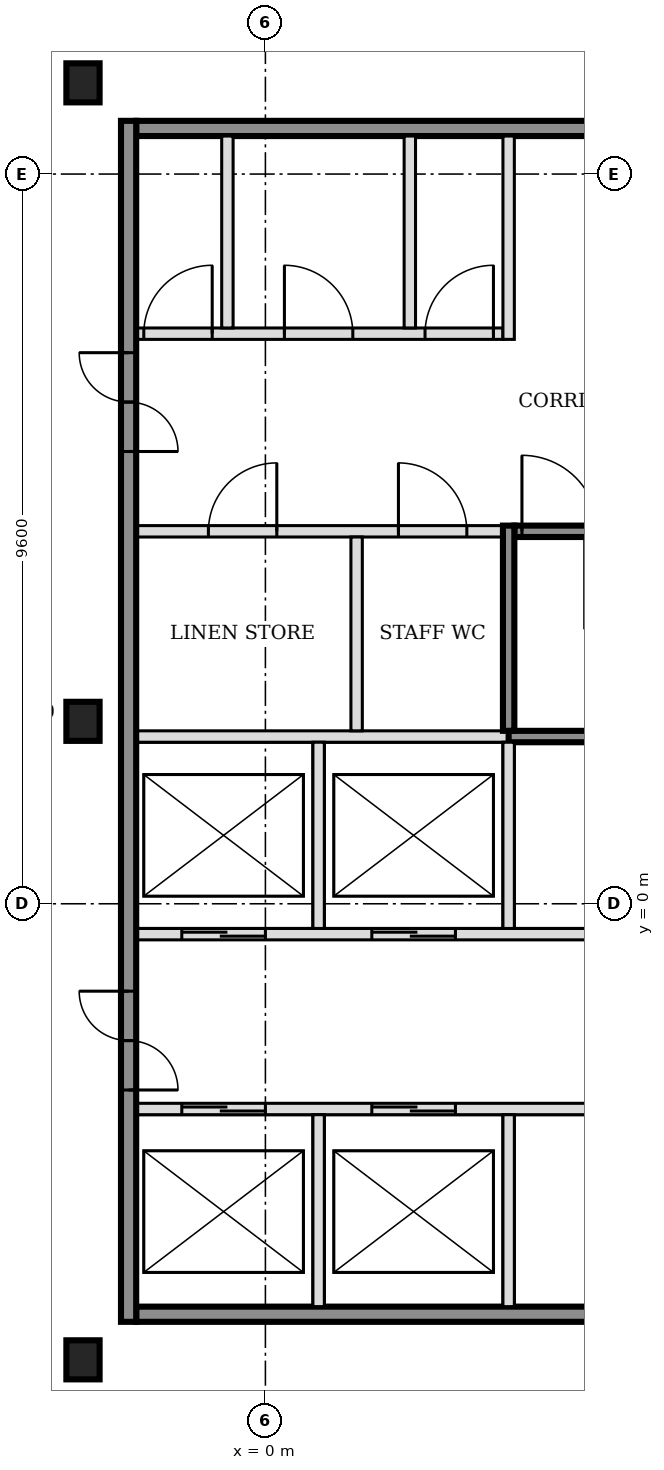
"""IFC4 building model, lengths in metres.
Left out: names, types, materials, properties, quantities, classifications, styles, units other than length and angle.
Written with IfcOpenShell. Run it as: python <this file> out.ifc"""

import sys

from ifc_helpers import new_model, si_unit, direction, frame, frame_2d, origin, origin_2d, place, context, subcontext, project, spatial, rectangle, i_section, extrude, element, fill, save


model = new_model("IFC4")
c1 = context("Model", 3, precision=1e-05, world=origin(), true_north=direction((0.0, 1.0)))
c2 = subcontext(c1, "Body", "Model", "MODEL_VIEW")
j1 = project(units=[si_unit("LENGTHUNIT", "METRE"), si_unit("PLANEANGLEUNIT", "RADIAN")], contexts=[c1])
p1 = place(None, origin())
s1 = spatial("IfcSite", under=j1, at=p1, CompositionType="ELEMENT")
p2 = place(p1, origin())
s2 = spatial("IfcBuilding", under=s1, at=p2, CompositionType="ELEMENT")
p3 = place(p2, frame((0.0, 0.0, 79.8)))
s3 = spatial("IfcBuildingStorey", under=s2, at=p3, CompositionType="ELEMENT", Elevation=79.8)
for number, where, z_axis, x_axis in (
    (1, (-2.4, -6.0, -0.15), (0.0, 0.0, 1.0), (1.0, 0.0, 0.0)),
    (2, (-2.4, 2.4, -0.15), (0.0, 0.0, 1.0), (1.0, 0.0, 0.0)),
    (3, (-2.4, 10.8, -0.15), (0.0, 0.0, 1.0), (1.0, 0.0, 0.0)),
):
    element("IfcColumn", number, at=place(p3, frame(where, z_axis=z_axis, x_axis=x_axis)), inside=s3, PredefinedType="COLUMN", context=c2, shape_type="SweptSolid", body=[
        extrude(i_section(OverallWidth=0.437, OverallDepth=0.514, WebThickness=0.061, FlangeThickness=0.097, FilletRadius=0.015, at=origin_2d()), origin(), (0.0, 0.0, 1.0), 3.6),
    ])
p4 = place(p3, frame((-1.7, -5.4, 0.0), z_axis=(0.0, 0.0, 1.0), x_axis=(1.0, 0.0, 0.0)))
e4 = element("IfcWall", 4, at=p4, inside=s3, PredefinedType="SOLIDWALL", context=c2, shape_type="SweptSolid", body=[
    extrude(rectangle(XDim=7.9, YDim=0.2, at=frame_2d((3.95, 0.0))), origin(), (0.0, 0.0, 1.0), 3.45),
])
p5 = place(p3, frame((-1.7, -2.7, 0.0), z_axis=(0.0, 0.0, 1.0), x_axis=(1.0, 0.0, 0.0)))
e5 = element("IfcWall", 5, at=p5, inside=s3, PredefinedType="SOLIDWALL", context=c2, shape_type="SweptSolid", body=[
    extrude(rectangle(XDim=7.9, YDim=0.15, at=frame_2d((3.95, 0.0))), origin(), (0.0, 0.0, 1.0), 3.45),
])
p6 = place(p5, frame((0.6, 0.0, 0.0)))
e6 = element("IfcOpeningElement", 6, at=p6, cuts=e5, PredefinedType="OPENING", context=c2, shape_type="SweptSolid", body=[
    extrude(rectangle(XDim=1.1, YDim=2.1, at=frame_2d((0.55, 1.05))), frame((0.0, 0.085, 0.0), z_axis=(0.0, -1.0, 0.0), x_axis=(1.0, 0.0, 0.0)), (0.0, 0.0, 1.0), 0.17),
])
p7 = place(p5, frame((3.1, 0.0, 0.0)))
e7 = element("IfcOpeningElement", 7, at=p7, cuts=e5, PredefinedType="OPENING", context=c2, shape_type="SweptSolid", body=[
    extrude(rectangle(XDim=1.1, YDim=2.1, at=frame_2d((0.55, 1.05))), frame((0.0, 0.085, 0.0), z_axis=(0.0, -1.0, 0.0), x_axis=(1.0, 0.0, 0.0)), (0.0, 0.0, 1.0), 0.17),
])
p8 = place(p3, frame((-1.7, -0.4, 0.0), z_axis=(0.0, 0.0, 1.0), x_axis=(1.0, 0.0, 0.0)))
e8 = element("IfcWall", 8, at=p8, inside=s3, PredefinedType="SOLIDWALL", context=c2, shape_type="SweptSolid", body=[
    extrude(rectangle(XDim=15.925, YDim=0.15, at=frame_2d((7.962, 0.0))), origin(), (0.0, 0.0, 1.0), 3.45),
])
p9 = place(p8, frame((0.6, 0.0, 0.0)))
e9 = element("IfcOpeningElement", 9, at=p9, cuts=e8, PredefinedType="OPENING", context=c2, shape_type="SweptSolid", body=[
    extrude(rectangle(XDim=1.1, YDim=2.1, at=frame_2d((0.55, 1.05))), frame((0.0, 0.085, 0.0), z_axis=(0.0, -1.0, 0.0), x_axis=(1.0, 0.0, 0.0)), (0.0, 0.0, 1.0), 0.17),
])
p10 = place(p8, frame((3.1, 0.0, 0.0)))
e10 = element("IfcOpeningElement", 10, at=p10, cuts=e8, PredefinedType="OPENING", context=c2, shape_type="SweptSolid", body=[
    extrude(rectangle(XDim=1.1, YDim=2.1, at=frame_2d((0.55, 1.05))), frame((0.0, 0.085, 0.0), z_axis=(0.0, -1.0, 0.0), x_axis=(1.0, 0.0, 0.0)), (0.0, 0.0, 1.0), 0.17),
])
p11 = place(p8, frame((11.575, 0.0, 0.0)))
e11 = element("IfcOpeningElement", 11, at=p11, cuts=e8, PredefinedType="OPENING", context=c2, shape_type="SweptSolid", body=[
    extrude(rectangle(XDim=1.2, YDim=2.1, at=frame_2d((0.6, 1.05))), frame((0.0, 0.085, 0.0), z_axis=(0.0, -1.0, 0.0), x_axis=(1.0, 0.0, 0.0)), (0.0, 0.0, 1.0), 0.17),
])
p12 = place(p8, frame((14.125, 0.0, 0.0)))
e12 = element("IfcOpeningElement", 12, at=p12, cuts=e8, PredefinedType="OPENING", context=c2, shape_type="SweptSolid", body=[
    extrude(rectangle(XDim=1.2, YDim=2.1, at=frame_2d((0.6, 1.05))), frame((0.0, 0.085, 0.0), z_axis=(0.0, -1.0, 0.0), x_axis=(1.0, 0.0, 0.0)), (0.0, 0.0, 1.0), 0.17),
])
p13 = place(p3, frame((-1.7, 2.2, 0.0), z_axis=(0.0, 0.0, 1.0), x_axis=(1.0, 0.0, 0.0)))
e13 = element("IfcWall", 13, at=p13, inside=s3, PredefinedType="SOLIDWALL", context=c2, shape_type="SweptSolid", body=[
    extrude(rectangle(XDim=4.9, YDim=0.15, at=frame_2d((2.45, 0.0))), origin(), (0.0, 0.0, 1.0), 3.45),
])
p14 = place(p3, frame((3.2, 2.2, 0.0), z_axis=(0.0, 0.0, 1.0), x_axis=(1.0, 0.0, 0.0)))
e14 = element("IfcWall", 14, at=p14, inside=s3, PredefinedType="SOLIDWALL", context=c2, shape_type="SweptSolid", body=[
    extrude(rectangle(XDim=6.5, YDim=0.15, at=frame_2d((3.25, 0.0))), origin(), (0.0, 0.0, 1.0), 3.45),
])
p15 = place(p3, frame((-1.7, 4.9, 0.0), z_axis=(0.0, 0.0, 1.0), x_axis=(1.0, 0.0, 0.0)))
e15 = element("IfcWall", 15, at=p15, inside=s3, PredefinedType="PARTITIONING", context=c2, shape_type="SweptSolid", body=[
    extrude(rectangle(XDim=4.825, YDim=0.15, at=frame_2d((2.413, 0.0))), origin(), (0.0, 0.0, 1.0), 3.45),
])
p16 = place(p15, frame((0.95, 0.0, 0.0)))
e16 = element("IfcOpeningElement", 16, at=p16, cuts=e15, PredefinedType="OPENING", context=c2, shape_type="SweptSolid", body=[
    extrude(rectangle(XDim=0.9, YDim=2.1, at=frame_2d((0.45, 1.05))), frame((0.0, 0.085, 0.0), z_axis=(0.0, -1.0, 0.0), x_axis=(1.0, 0.0, 0.0)), (0.0, 0.0, 1.0), 0.17),
])
p17 = place(p15, frame((3.45, 0.0, 0.0)))
e17 = element("IfcOpeningElement", 17, at=p17, cuts=e15, PredefinedType="OPENING", context=c2, shape_type="SweptSolid", body=[
    extrude(rectangle(XDim=0.9, YDim=2.1, at=frame_2d((0.45, 1.05))), frame((0.0, 0.085, 0.0), z_axis=(0.0, -1.0, 0.0), x_axis=(1.0, 0.0, 0.0)), (0.0, 0.0, 1.0), 0.17),
])
p18 = place(p3, frame((3.275, 4.9, 0.0), z_axis=(0.0, 0.0, 1.0), x_axis=(1.0, 0.0, 0.0)))
e18 = element("IfcWall", 18, at=p18, inside=s3, PredefinedType="SOLIDWALL", context=c2, shape_type="SweptSolid", body=[
    extrude(rectangle(XDim=6.425, YDim=0.15, at=frame_2d((3.212, 0.0))), origin(), (0.0, 0.0, 1.0), 3.45),
])
p19 = place(p18, frame((0.1, 0.0, 0.0)))
e19 = element("IfcOpeningElement", 19, at=p19, cuts=e18, PredefinedType="OPENING", context=c2, shape_type="SweptSolid", body=[
    extrude(rectangle(XDim=1.0, YDim=2.1, at=frame_2d((0.5, 1.05))), frame((0.0, 0.085, 0.0), z_axis=(0.0, -1.0, 0.0), x_axis=(1.0, 0.0, 0.0)), (0.0, 0.0, 1.0), 0.17),
])
p20 = place(p3, frame((-1.7, 7.5, 0.0), z_axis=(0.0, 0.0, 1.0), x_axis=(1.0, 0.0, 0.0)))
e20 = element("IfcWall", 20, at=p20, inside=s3, PredefinedType="PARTITIONING", context=c2, shape_type="SweptSolid", body=[
    extrude(rectangle(XDim=4.825, YDim=0.15, at=frame_2d((2.413, 0.0))), origin(), (0.0, 0.0, 1.0), 3.45),
])
p21 = place(p20, frame((0.1, 0.0, 0.0)))
e21 = element("IfcOpeningElement", 21, at=p21, cuts=e20, PredefinedType="OPENING", context=c2, shape_type="SweptSolid", body=[
    extrude(rectangle(XDim=0.9, YDim=2.1, at=frame_2d((0.45, 1.05))), frame((0.0, 0.085, 0.0), z_axis=(0.0, -1.0, 0.0), x_axis=(1.0, 0.0, 0.0)), (0.0, 0.0, 1.0), 0.17),
])
p22 = place(p20, frame((1.95, 0.0, 0.0)))
e22 = element("IfcOpeningElement", 22, at=p22, cuts=e20, PredefinedType="OPENING", context=c2, shape_type="SweptSolid", body=[
    extrude(rectangle(XDim=0.9, YDim=2.1, at=frame_2d((0.45, 1.05))), frame((0.0, 0.085, 0.0), z_axis=(0.0, -1.0, 0.0), x_axis=(1.0, 0.0, 0.0)), (0.0, 0.0, 1.0), 0.17),
])
p23 = place(p20, frame((3.8, 0.0, 0.0)))
e23 = element("IfcOpeningElement", 23, at=p23, cuts=e20, PredefinedType="OPENING", context=c2, shape_type="SweptSolid", body=[
    extrude(rectangle(XDim=0.9, YDim=2.1, at=frame_2d((0.45, 1.05))), frame((0.0, 0.085, 0.0), z_axis=(0.0, -1.0, 0.0), x_axis=(1.0, 0.0, 0.0)), (0.0, 0.0, 1.0), 0.17),
])
p24 = place(p3, frame((-1.7, 10.2, 0.0), z_axis=(0.0, 0.0, 1.0), x_axis=(1.0, 0.0, 0.0)))
e24 = element("IfcWall", 24, at=p24, inside=s3, PredefinedType="SOLIDWALL", context=c2, shape_type="SweptSolid", body=[
    extrude(rectangle(XDim=7.9, YDim=0.2, at=frame_2d((3.95, 0.0))), origin(), (0.0, 0.0, 1.0), 3.45),
])
p25 = place(p3, frame((-1.8, -5.5, 0.0), z_axis=(0.0, 0.0, 1.0), x_axis=(0.0, 1.0, 0.0)))
e25 = element("IfcWall", 25, at=p25, inside=s3, PredefinedType="SOLIDWALL", context=c2, shape_type="SweptSolid", body=[
    extrude(rectangle(XDim=15.8, YDim=0.2, at=frame_2d((7.9, 0.0))), origin(), (0.0, 0.0, 1.0), 3.45),
])
p26 = place(p25, frame((3.05, 0.0, 0.0)))
e26 = element("IfcOpeningElement", 26, at=p26, cuts=e25, PredefinedType="OPENING", context=c2, shape_type="SweptSolid", body=[
    extrude(rectangle(XDim=1.3, YDim=2.1, at=frame_2d((0.65, 1.05))), frame((0.0, 0.11, 0.0), z_axis=(0.0, -1.0, 0.0), x_axis=(1.0, 0.0, 0.0)), (0.0, 0.0, 1.0), 0.22),
])
p27 = place(p25, frame((11.45, 0.0, 0.0)))
e27 = element("IfcOpeningElement", 27, at=p27, cuts=e25, PredefinedType="OPENING", context=c2, shape_type="SweptSolid", body=[
    extrude(rectangle(XDim=1.3, YDim=2.1, at=frame_2d((0.65, 1.05))), frame((0.0, 0.11, 0.0), z_axis=(0.0, -1.0, 0.0), x_axis=(1.0, 0.0, 0.0)), (0.0, 0.0, 1.0), 0.22),
])
p28 = place(p3, frame((-0.5, 7.575, 0.0), z_axis=(0.0, 0.0, 1.0), x_axis=(0.0, 1.0, 0.0)))
e28 = element("IfcWall", 28, at=p28, inside=s3, PredefinedType="PARTITIONING", context=c2, shape_type="SweptSolid", body=[
    extrude(rectangle(XDim=2.525, YDim=0.15, at=frame_2d((1.263, 0.0))), origin(), (0.0, 0.0, 1.0), 3.45),
])
p29 = place(p3, frame((0.7, -5.3, 0.0), z_axis=(0.0, 0.0, 1.0), x_axis=(0.0, 1.0, 0.0)))
e29 = element("IfcWall", 29, at=p29, inside=s3, PredefinedType="SOLIDWALL", context=c2, shape_type="SweptSolid", body=[
    extrude(rectangle(XDim=2.525, YDim=0.15, at=frame_2d((1.263, 0.0))), origin(), (0.0, 0.0, 1.0), 3.45),
])
p30 = place(p3, frame((0.7, -0.325, 0.0), z_axis=(0.0, 0.0, 1.0), x_axis=(0.0, 1.0, 0.0)))
e30 = element("IfcWall", 30, at=p30, inside=s3, PredefinedType="SOLIDWALL", context=c2, shape_type="SweptSolid", body=[
    extrude(rectangle(XDim=2.45, YDim=0.15, at=frame_2d((1.225, 0.0))), origin(), (0.0, 0.0, 1.0), 3.45),
])
p31 = place(p3, frame((1.2, 2.275, 0.0), z_axis=(0.0, 0.0, 1.0), x_axis=(0.0, 1.0, 0.0)))
e31 = element("IfcWall", 31, at=p31, inside=s3, PredefinedType="PARTITIONING", context=c2, shape_type="SweptSolid", body=[
    extrude(rectangle(XDim=2.55, YDim=0.15, at=frame_2d((1.275, 0.0))), origin(), (0.0, 0.0, 1.0), 3.45),
])
p32 = place(p3, frame((1.9, 7.575, 0.0), z_axis=(0.0, 0.0, 1.0), x_axis=(0.0, 1.0, 0.0)))
e32 = element("IfcWall", 32, at=p32, inside=s3, PredefinedType="PARTITIONING", context=c2, shape_type="SweptSolid", body=[
    extrude(rectangle(XDim=2.525, YDim=0.15, at=frame_2d((1.263, 0.0))), origin(), (0.0, 0.0, 1.0), 3.45),
])
p33 = place(p3, frame((3.2, -5.3, 0.0), z_axis=(0.0, 0.0, 1.0), x_axis=(0.0, 1.0, 0.0)))
e33 = element("IfcWall", 33, at=p33, inside=s3, PredefinedType="SOLIDWALL", context=c2, shape_type="SweptSolid", body=[
    extrude(rectangle(XDim=2.525, YDim=0.15, at=frame_2d((1.263, 0.0))), origin(), (0.0, 0.0, 1.0), 3.45),
])
p34 = place(p3, frame((3.2, -0.325, 0.0), z_axis=(0.0, 0.0, 1.0), x_axis=(0.0, 1.0, 0.0)))
e34 = element("IfcWall", 34, at=p34, inside=s3, PredefinedType="SOLIDWALL", context=c2, shape_type="SweptSolid", body=[
    extrude(rectangle(XDim=2.45, YDim=0.15, at=frame_2d((1.225, 0.0))), origin(), (0.0, 0.0, 1.0), 3.45),
])
p35 = place(p3, frame((3.2, 2.275, 0.0), z_axis=(0.0, 0.0, 1.0), x_axis=(0.0, 1.0, 0.0)))
e35 = element("IfcWall", 35, at=p35, inside=s3, PredefinedType="SOLIDWALL", context=c2, shape_type="SweptSolid", body=[
    extrude(rectangle(XDim=2.7, YDim=0.15, at=frame_2d((1.35, 0.0))), origin(), (0.0, 0.0, 1.0), 3.45),
])
p36 = place(p3, frame((3.2, 7.425, 0.0), z_axis=(0.0, 0.0, 1.0), x_axis=(0.0, 1.0, 0.0)))
e36 = element("IfcWall", 36, at=p36, inside=s3, PredefinedType="PARTITIONING", context=c2, shape_type="SweptSolid", body=[
    extrude(rectangle(XDim=2.675, YDim=0.15, at=frame_2d((1.337, 0.0))), origin(), (0.0, 0.0, 1.0), 3.45),
])
p37 = place(p6, origin())
e37 = element("IfcDoor", 37, at=p37, inside=s3, OperationType="DOUBLE_DOOR_SLIDING", PredefinedType="DOOR", context=c2, shape_type="SweptSolid", body=[
    extrude(rectangle(XDim=1.1, YDim=2.1, at=frame_2d((0.55, 1.05))), frame((0.0, 0.025, 0.0), z_axis=(0.0, -1.0, 0.0), x_axis=(1.0, 0.0, 0.0)), (0.0, 0.0, 1.0), 0.05),
])
fill(e6, e37)
p38 = place(p7, origin())
e38 = element("IfcDoor", 38, at=p38, inside=s3, OperationType="DOUBLE_DOOR_SLIDING", PredefinedType="DOOR", context=c2, shape_type="SweptSolid", body=[
    extrude(rectangle(XDim=1.1, YDim=2.1, at=frame_2d((0.55, 1.05))), frame((0.0, 0.025, 0.0), z_axis=(0.0, -1.0, 0.0), x_axis=(1.0, 0.0, 0.0)), (0.0, 0.0, 1.0), 0.05),
])
fill(e7, e38)
p39 = place(p9, origin())
e39 = element("IfcDoor", 39, at=p39, inside=s3, OperationType="DOUBLE_DOOR_SLIDING", PredefinedType="DOOR", context=c2, shape_type="SweptSolid", body=[
    extrude(rectangle(XDim=1.1, YDim=2.1, at=frame_2d((0.55, 1.05))), frame((0.0, 0.025, 0.0), z_axis=(0.0, -1.0, 0.0), x_axis=(1.0, 0.0, 0.0)), (0.0, 0.0, 1.0), 0.05),
])
fill(e9, e39)
p40 = place(p10, origin())
e40 = element("IfcDoor", 40, at=p40, inside=s3, OperationType="DOUBLE_DOOR_SLIDING", PredefinedType="DOOR", context=c2, shape_type="SweptSolid", body=[
    extrude(rectangle(XDim=1.1, YDim=2.1, at=frame_2d((0.55, 1.05))), frame((0.0, 0.025, 0.0), z_axis=(0.0, -1.0, 0.0), x_axis=(1.0, 0.0, 0.0)), (0.0, 0.0, 1.0), 0.05),
])
fill(e10, e40)
p41 = place(p19, origin())
e41 = element("IfcDoor", 41, at=p41, inside=s3, OperationType="SINGLE_SWING_LEFT", PredefinedType="DOOR", context=c2, shape_type="SweptSolid", body=[
    extrude(rectangle(XDim=1.0, YDim=2.1, at=frame_2d((0.5, 1.05))), frame((0.0, 0.025, 0.0), z_axis=(0.0, -1.0, 0.0), x_axis=(1.0, 0.0, 0.0)), (0.0, 0.0, 1.0), 0.05),
])
fill(e19, e41)
p42 = place(p26, origin())
e42 = element("IfcDoor", 42, at=p42, inside=s3, OperationType="DOUBLE_DOOR_SINGLE_SWING", PredefinedType="DOOR", context=c2, shape_type="SweptSolid", body=[
    extrude(rectangle(XDim=1.3, YDim=2.1, at=frame_2d((0.65, 1.05))), frame((0.0, 0.025, 0.0), z_axis=(0.0, -1.0, 0.0), x_axis=(1.0, 0.0, 0.0)), (0.0, 0.0, 1.0), 0.05),
])
fill(e26, e42)
p43 = place(p27, origin())
e43 = element("IfcDoor", 43, at=p43, inside=s3, OperationType="DOUBLE_DOOR_SINGLE_SWING", PredefinedType="DOOR", context=c2, shape_type="SweptSolid", body=[
    extrude(rectangle(XDim=1.3, YDim=2.1, at=frame_2d((0.65, 1.05))), frame((0.0, 0.025, 0.0), z_axis=(0.0, -1.0, 0.0), x_axis=(1.0, 0.0, 0.0)), (0.0, 0.0, 1.0), 0.05),
])
fill(e27, e43)
p44 = place(p16, origin())
e44 = element("IfcDoor", 44, at=p44, inside=s3, OperationType="SINGLE_SWING_RIGHT", PredefinedType="DOOR", context=c2, shape_type="SweptSolid", body=[
    extrude(rectangle(XDim=0.9, YDim=2.1, at=frame_2d((0.45, 1.05))), frame((0.0, 0.025, 0.0), z_axis=(0.0, -1.0, 0.0), x_axis=(1.0, 0.0, 0.0)), (0.0, 0.0, 1.0), 0.05),
])
fill(e16, e44)
p45 = place(p17, origin())
e45 = element("IfcDoor", 45, at=p45, inside=s3, OperationType="SINGLE_SWING_LEFT", PredefinedType="DOOR", context=c2, shape_type="SweptSolid", body=[
    extrude(rectangle(XDim=0.9, YDim=2.1, at=frame_2d((0.45, 1.05))), frame((0.0, 0.025, 0.0), z_axis=(0.0, -1.0, 0.0), x_axis=(1.0, 0.0, 0.0)), (0.0, 0.0, 1.0), 0.05),
])
fill(e17, e45)
p46 = place(p21, origin())
e46 = element("IfcDoor", 46, at=p46, inside=s3, OperationType="SINGLE_SWING_RIGHT", PredefinedType="DOOR", context=c2, shape_type="SweptSolid", body=[
    extrude(rectangle(XDim=0.9, YDim=2.1, at=frame_2d((0.45, 1.05))), frame((0.0, 0.025, 0.0), z_axis=(0.0, -1.0, 0.0), x_axis=(1.0, 0.0, 0.0)), (0.0, 0.0, 1.0), 0.05),
])
fill(e21, e46)
p47 = place(p22, origin())
e47 = element("IfcDoor", 47, at=p47, inside=s3, OperationType="SINGLE_SWING_LEFT", PredefinedType="DOOR", context=c2, shape_type="SweptSolid", body=[
    extrude(rectangle(XDim=0.9, YDim=2.1, at=frame_2d((0.45, 1.05))), frame((0.0, 0.025, 0.0), z_axis=(0.0, -1.0, 0.0), x_axis=(1.0, 0.0, 0.0)), (0.0, 0.0, 1.0), 0.05),
])
fill(e22, e47)
p48 = place(p23, origin())
e48 = element("IfcDoor", 48, at=p48, inside=s3, OperationType="SINGLE_SWING_RIGHT", PredefinedType="DOOR", context=c2, shape_type="SweptSolid", body=[
    extrude(rectangle(XDim=0.9, YDim=2.1, at=frame_2d((0.45, 1.05))), frame((0.0, 0.025, 0.0), z_axis=(0.0, -1.0, 0.0), x_axis=(1.0, 0.0, 0.0)), (0.0, 0.0, 1.0), 0.05),
])
fill(e23, e48)
save(model, sys.argv[1])
